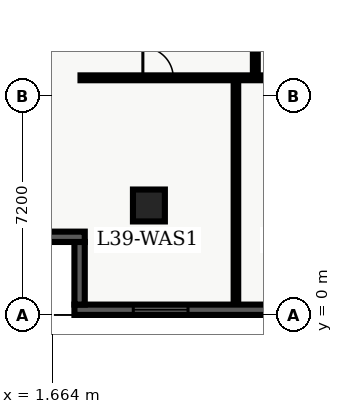
"""IFC4 building model, lengths in metres.
Left out: names, types, materials, properties, quantities, classifications, styles, units other than length and angle.
Written with IfcOpenShell. Run it as: python <this file> out.ifc"""

import sys

from ifc_helpers import new_model, entity, si_unit, converted_unit, direction, frame, origin_with_axes, origin_2d_with_axis, place, context, subcontext, project, spatial, polyline, rectangle, outline, extrude, element, fill, save


model = new_model("IFC4")
c1 = context("Model", 3, precision=1e-05, world=origin_with_axes(), true_north=direction((0.0, 1.0)))
c2 = subcontext(c1, "Body", "Model", "MODEL_VIEW")
j1 = project(units=[si_unit("LENGTHUNIT", "METRE"), converted_unit("PLANEANGLEUNIT", "DEGREE", entity("IfcPlaneAngleMeasure", 0.017), si_unit("PLANEANGLEUNIT", "RADIAN"), dimensions=[0, 0, 0, 0, 0, 0, 0])], contexts=[c1])
p1 = place(None, origin_with_axes())
s1 = spatial("IfcSite", under=j1, at=p1, CompositionType="ELEMENT")
p2 = place(p1, origin_with_axes())
s2 = spatial("IfcBuilding", under=s1, at=p2, CompositionType="ELEMENT")
p3 = place(p2, frame((0.0, 0.0, 160.2), z_axis=(0.0, 0.0, 1.0), x_axis=(1.0, 0.0, 0.0)))
s3 = spatial("IfcBuildingStorey", under=s2, at=p3, CompositionType="ELEMENT", Elevation=160.2)
p4 = place(p3, frame((4.85, 3.6, 0.0), z_axis=(0.0, 0.0, 1.0), x_axis=(1.0, 0.0, 0.0)))
e1 = element("IfcColumn", 1, at=p4, inside=s3, PredefinedType="COLUMN", context=c2, shape_type="SweptSolid", body=[
    extrude(rectangle(XDim=1.05, YDim=1.05, at=origin_2d_with_axis()), origin_with_axes(), (0.0, 0.0, 1.0), 3.9),
])
p5 = place(p3, frame((2.6, 7.8, 0.0), z_axis=(0.0, 0.0, 1.0), x_axis=(1.0, 0.0, 0.0)))
e2 = element("IfcWall", 2, at=p5, inside=s3, PredefinedType="PARTITIONING", context=c2, shape_type="SweptSolid", body=[
    extrude(outline(polyline([(0.0, -0.08), (18.55, -0.08), (18.55, 0.08), (0.0, 0.08), (0.0, -0.08)])), origin_with_axes(), (0.0, 0.0, 1.0), 2.7),
])
p6 = place(p5, frame((2.551, 0.0, 0.0), z_axis=(0.0, 0.0, 1.0), x_axis=(1.0, 0.0, 0.0)))
e3 = element("IfcOpeningElement", 3, at=p6, cuts=e2, PredefinedType="OPENING", context=c2, shape_type="SweptSolid", body=[
    extrude(rectangle(XDim=1.0, YDim=0.18, at=origin_2d_with_axis()), origin_with_axes(), (0.0, 0.0, 1.0), 2.15),
])
p7 = place(p5, frame((8.065, 0.0, 0.0), z_axis=(0.0, 0.0, 1.0), x_axis=(1.0, 0.0, 0.0)))
e4 = element("IfcOpeningElement", 4, at=p7, cuts=e2, PredefinedType="OPENING", context=c2, shape_type="SweptSolid", body=[
    extrude(rectangle(XDim=1.0, YDim=0.18, at=origin_2d_with_axis()), origin_with_axes(), (0.0, 0.0, 1.0), 2.15),
])
p8 = place(p5, frame((14.758, 0.0, 0.0), z_axis=(0.0, 0.0, 1.0), x_axis=(1.0, 0.0, 0.0)))
e5 = element("IfcOpeningElement", 5, at=p8, cuts=e2, PredefinedType="OPENING", context=c2, shape_type="SweptSolid", body=[
    extrude(rectangle(XDim=1.0, YDim=0.18, at=origin_2d_with_axis()), origin_with_axes(), (0.0, 0.0, 1.0), 2.15),
])
p9 = place(p3, frame((8.35, 7.8, 0.0), z_axis=(0.0, 0.0, 1.0), x_axis=(0.0, 1.0, 0.0)))
e6 = element("IfcWall", 6, at=p9, inside=s3, PredefinedType="PARTITIONING", context=c2, shape_type="SweptSolid", body=[
    extrude(outline(polyline([(0.0, -0.08), (12.6, -0.08), (12.6, 0.08), (0.0, 0.08), (0.0, -0.08)])), origin_with_axes(), (0.0, 0.0, 1.0), 2.7),
])
p10 = place(p9, frame((2.892, 0.0, 0.0), z_axis=(0.0, 0.0, 1.0), x_axis=(1.0, 0.0, 0.0)))
e7 = element("IfcOpeningElement", 7, at=p10, cuts=e6, PredefinedType="OPENING", context=c2, shape_type="SweptSolid", body=[
    extrude(rectangle(XDim=1.0, YDim=0.18, at=origin_2d_with_axis()), origin_with_axes(), (0.0, 0.0, 1.0), 2.15),
])
p11 = place(p9, frame((9.087, 0.0, 0.0), z_axis=(0.0, 0.0, 1.0), x_axis=(1.0, 0.0, 0.0)))
e8 = element("IfcOpeningElement", 8, at=p11, cuts=e6, PredefinedType="OPENING", context=c2, shape_type="SweptSolid", body=[
    extrude(rectangle(XDim=1.0, YDim=0.18, at=origin_2d_with_axis()), origin_with_axes(), (0.0, 0.0, 1.0), 2.15),
])
p12 = place(p3, frame((7.712, 0.335, 0.0), z_axis=(0.0, 0.0, 1.0), x_axis=(0.0, 1.0, 0.0)))
e9 = element("IfcWall", 9, at=p12, inside=s3, PredefinedType="PARTITIONING", context=c2, shape_type="SweptSolid", body=[
    extrude(outline(polyline([(0.0, -0.075), (7.365, -0.075), (7.365, 0.075), (0.0, 0.075), (0.0, -0.075)])), origin_with_axes(), (0.0, 0.0, 1.0), 2.7),
])
p13 = place(p3, frame((57.26, 0.17, 0.0), z_axis=(0.0, 0.0, 1.0), x_axis=(-1.0, 0.0, 0.0)))
e10 = element("IfcWall", 10, at=p13, inside=s3, PredefinedType="SOLIDWALL", context=c2, shape_type="SweptSolid", body=[
    extrude(outline(polyline([(0.0, -0.17), (54.86, -0.17), (54.86, 0.17), (0.0, 0.17), (0.0, -0.17)])), origin_with_axes(), (0.0, 0.0, 1.0), 3.66),
])
p14 = place(p13, frame((2.836, 0.0, 0.45), z_axis=(0.0, 0.0, 1.0), x_axis=(1.0, 0.0, 0.0)))
e11 = element("IfcOpeningElement", 11, at=p14, cuts=e10, PredefinedType="OPENING", context=c2, shape_type="SweptSolid", body=[
    extrude(rectangle(XDim=1.8, YDim=0.36, at=origin_2d_with_axis()), origin_with_axes(), (0.0, 0.0, 1.0), 2.1),
])
p15 = place(p13, frame((7.307, 0.0, 0.45), z_axis=(0.0, 0.0, 1.0), x_axis=(1.0, 0.0, 0.0)))
e12 = element("IfcOpeningElement", 12, at=p15, cuts=e10, PredefinedType="OPENING", context=c2, shape_type="SweptSolid", body=[
    extrude(rectangle(XDim=1.8, YDim=0.36, at=origin_2d_with_axis()), origin_with_axes(), (0.0, 0.0, 1.0), 2.1),
])
p16 = place(p13, frame((11.779, 0.0, 0.45), z_axis=(0.0, 0.0, 1.0), x_axis=(1.0, 0.0, 0.0)))
e13 = element("IfcOpeningElement", 13, at=p16, cuts=e10, PredefinedType="OPENING", context=c2, shape_type="SweptSolid", body=[
    extrude(rectangle(XDim=1.8, YDim=0.36, at=origin_2d_with_axis()), origin_with_axes(), (0.0, 0.0, 1.0), 2.1),
])
p17 = place(p13, frame((16.251, 0.0, 0.45), z_axis=(0.0, 0.0, 1.0), x_axis=(1.0, 0.0, 0.0)))
e14 = element("IfcOpeningElement", 14, at=p17, cuts=e10, PredefinedType="OPENING", context=c2, shape_type="SweptSolid", body=[
    extrude(rectangle(XDim=1.8, YDim=0.36, at=origin_2d_with_axis()), origin_with_axes(), (0.0, 0.0, 1.0), 2.1),
])
p18 = place(p13, frame((20.723, 0.0, 0.45), z_axis=(0.0, 0.0, 1.0), x_axis=(1.0, 0.0, 0.0)))
e15 = element("IfcOpeningElement", 15, at=p18, cuts=e10, PredefinedType="OPENING", context=c2, shape_type="SweptSolid", body=[
    extrude(rectangle(XDim=1.8, YDim=0.36, at=origin_2d_with_axis()), origin_with_axes(), (0.0, 0.0, 1.0), 2.1),
])
p19 = place(p13, frame((25.194, 0.0, 0.45), z_axis=(0.0, 0.0, 1.0), x_axis=(1.0, 0.0, 0.0)))
e16 = element("IfcOpeningElement", 16, at=p19, cuts=e10, PredefinedType="OPENING", context=c2, shape_type="SweptSolid", body=[
    extrude(rectangle(XDim=1.8, YDim=0.36, at=origin_2d_with_axis()), origin_with_axes(), (0.0, 0.0, 1.0), 2.1),
])
p20 = place(p13, frame((34.138, 0.0, 0.45), z_axis=(0.0, 0.0, 1.0), x_axis=(1.0, 0.0, 0.0)))
e17 = element("IfcOpeningElement", 17, at=p20, cuts=e10, PredefinedType="OPENING", context=c2, shape_type="SweptSolid", body=[
    extrude(rectangle(XDim=1.8, YDim=0.36, at=origin_2d_with_axis()), origin_with_axes(), (0.0, 0.0, 1.0), 2.1),
])
p21 = place(p13, frame((38.609, 0.0, 0.45), z_axis=(0.0, 0.0, 1.0), x_axis=(1.0, 0.0, 0.0)))
e18 = element("IfcOpeningElement", 18, at=p21, cuts=e10, PredefinedType="OPENING", context=c2, shape_type="SweptSolid", body=[
    extrude(rectangle(XDim=1.8, YDim=0.36, at=origin_2d_with_axis()), origin_with_axes(), (0.0, 0.0, 1.0), 2.1),
])
p22 = place(p13, frame((42.231, 0.0, 0.45), z_axis=(0.0, 0.0, 1.0), x_axis=(1.0, 0.0, 0.0)))
e19 = element("IfcOpeningElement", 19, at=p22, cuts=e10, PredefinedType="OPENING", context=c2, shape_type="SweptSolid", body=[
    extrude(rectangle(XDim=1.8, YDim=0.36, at=origin_2d_with_axis()), origin_with_axes(), (0.0, 0.0, 1.0), 2.1),
])
p23 = place(p13, frame((47.553, 0.0, 0.45), z_axis=(0.0, 0.0, 1.0), x_axis=(1.0, 0.0, 0.0)))
e20 = element("IfcOpeningElement", 20, at=p23, cuts=e10, PredefinedType="OPENING", context=c2, shape_type="SweptSolid", body=[
    extrude(rectangle(XDim=1.8, YDim=0.36, at=origin_2d_with_axis()), origin_with_axes(), (0.0, 0.0, 1.0), 2.1),
])
p24 = place(p13, frame((52.024, 0.0, 0.45), z_axis=(0.0, 0.0, 1.0), x_axis=(1.0, 0.0, 0.0)))
e21 = element("IfcOpeningElement", 21, at=p24, cuts=e10, PredefinedType="OPENING", context=c2, shape_type="SweptSolid", body=[
    extrude(rectangle(XDim=1.8, YDim=0.36, at=origin_2d_with_axis()), origin_with_axes(), (0.0, 0.0, 1.0), 2.1),
])
p25 = place(p3, frame((2.57, 0.34, 0.0), z_axis=(0.0, 0.0, 1.0), x_axis=(0.0, 1.0, 0.0)))
e22 = element("IfcWall", 22, at=p25, inside=s3, PredefinedType="SOLIDWALL", context=c2, shape_type="SweptSolid", body=[
    extrude(outline(polyline([(0.0, -0.17), (2.06, -0.17), (2.06, 0.17), (0.0, 0.17), (0.0, -0.17)])), origin_with_axes(), (0.0, 0.0, 1.0), 3.66),
])
p26 = place(p3, frame((2.74, 2.57, 0.0), z_axis=(0.0, 0.0, 1.0), x_axis=(-1.0, 0.0, 0.0)))
e23 = element("IfcWall", 23, at=p26, inside=s3, PredefinedType="SOLIDWALL", context=c2, shape_type="SweptSolid", body=[
    extrude(outline(polyline([(0.0, -0.17), (2.74, -0.17), (2.74, 0.17), (0.0, 0.17), (0.0, -0.17)])), origin_with_axes(), (0.0, 0.0, 1.0), 3.66),
])
p27 = place(p5, frame((2.551, 0.0, 0.0), z_axis=(0.0, 0.0, 1.0), x_axis=(1.0, 0.0, 0.0)))
e24 = element("IfcDoor", 24, at=p27, inside=s3, OperationType="SINGLE_SWING_LEFT", PredefinedType="DOOR", context=c2, shape_type="SweptSolid", body=[
    extrude(rectangle(XDim=1.0, YDim=0.09, at=origin_2d_with_axis()), origin_with_axes(), (0.0, 0.0, 1.0), 2.15),
])
fill(e3, e24)
p28 = place(p13, frame((52.024, 0.0, 0.45), z_axis=(0.0, 0.0, 1.0), x_axis=(1.0, 0.0, 0.0)))
e25 = element("IfcWindow", 25, at=p28, inside=s3, PredefinedType="WINDOW", context=c2, shape_type="SweptSolid", body=[
    extrude(rectangle(XDim=1.8, YDim=0.09, at=origin_2d_with_axis()), origin_with_axes(), (0.0, 0.0, 1.0), 2.1),
])
fill(e21, e25)
save(model, sys.argv[1])
